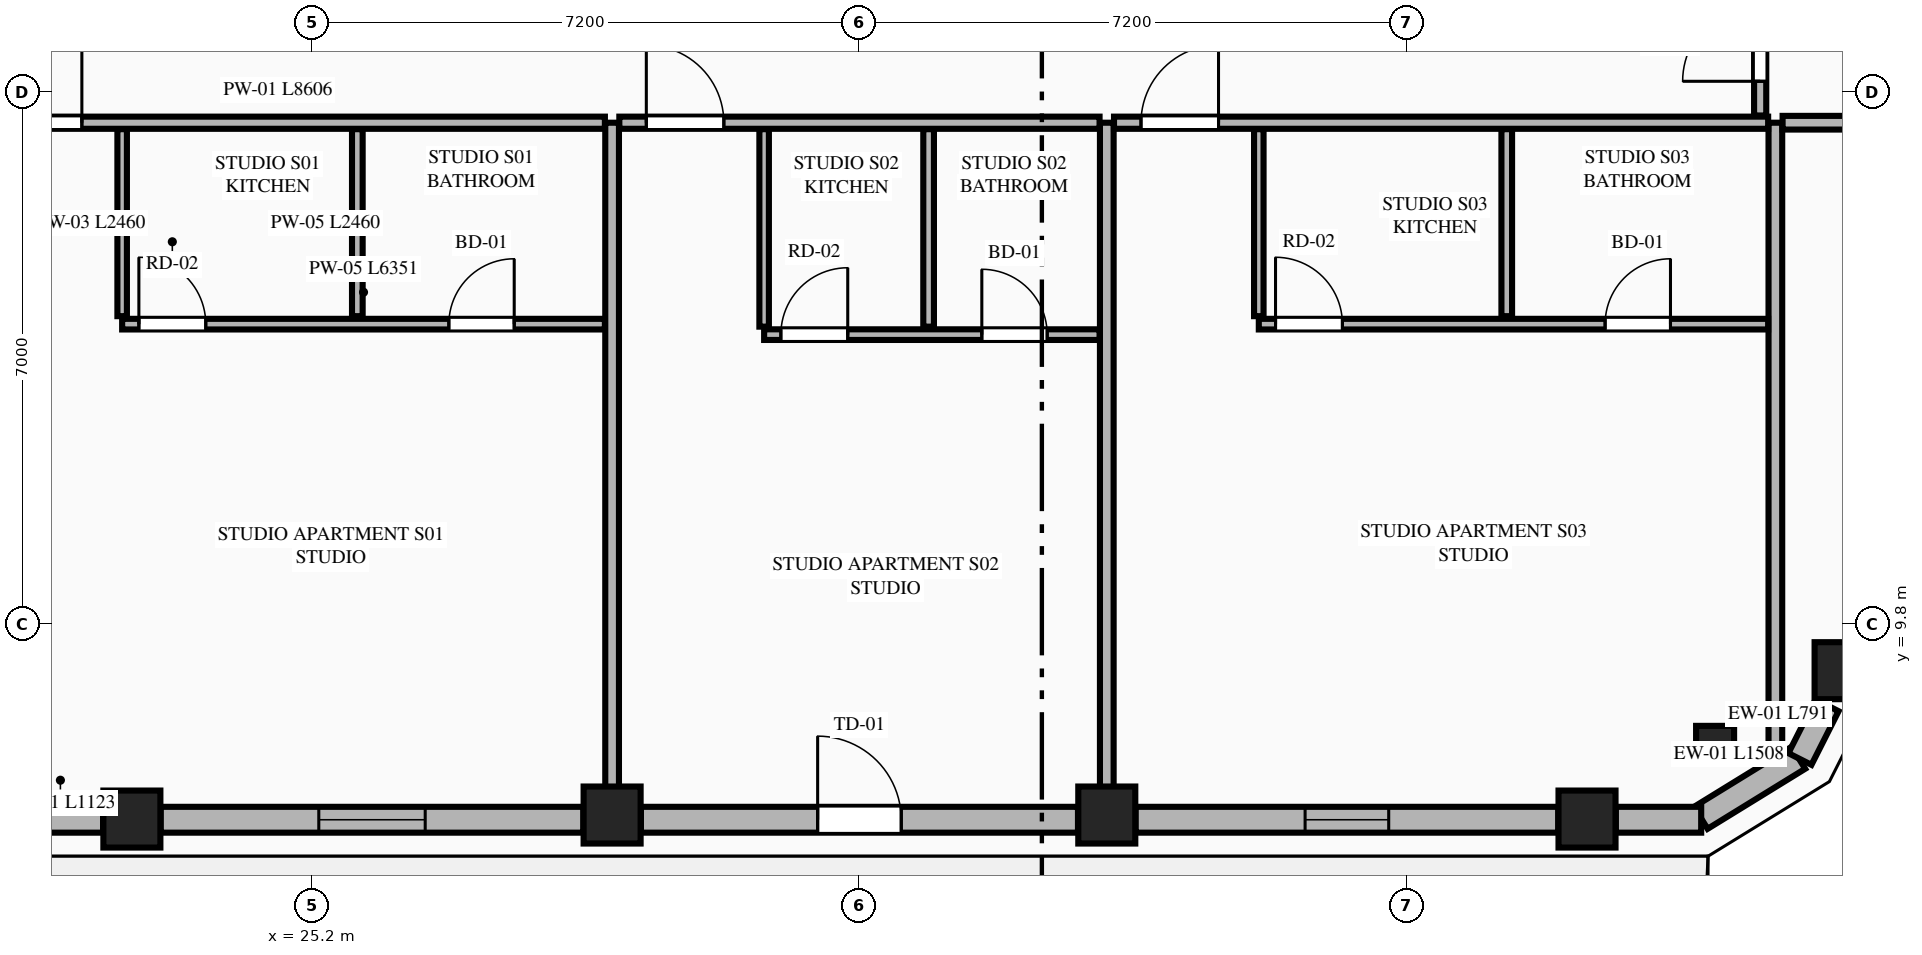
"""IFC4 building model, lengths in metres.
Left out: names, types, materials, properties, quantities, classifications, styles, units other than length and angle.
Written with IfcOpenShell. Run it as: python <this file> out.ifc"""

import sys

from ifc_helpers import new_model, si_unit, direction, frame, frame_2d, origin, origin_2d, place, context, subcontext, project, spatial, rectangle, extrude, element, fill, save


model = new_model("IFC4")
c1 = context("Model", 3, precision=1e-05, world=origin(), true_north=direction((0.0, 1.0)))
c2 = subcontext(c1, "Body", "Model", "MODEL_VIEW")
j1 = project(units=[si_unit("LENGTHUNIT", "METRE"), si_unit("PLANEANGLEUNIT", "RADIAN")], contexts=[c1])
p1 = place(None, origin())
s1 = spatial("IfcSite", under=j1, at=p1, CompositionType="ELEMENT")
p2 = place(p1, origin())
s2 = spatial("IfcBuilding", under=s1, at=p2, CompositionType="ELEMENT")
p3 = place(p2, frame((0.0, 0.0, 245.25)))
s3 = spatial("IfcBuildingStorey", under=s2, at=p3, CompositionType="ELEMENT", Elevation=245.25)
for number, where, z_axis, x_axis in (
    (1, (22.828, 7.239, 0.0), (0.0, 0.0, 1.0), (1.0, 0.0, 0.0)),
    (2, (29.146, 7.292, 0.0), (0.0, 0.0, 1.0), (1.0, 0.0, 0.0)),
    (3, (35.654, 7.292, 0.0), (0.0, 0.0, 1.0), (1.0, 0.0, 0.0)),
    (4, (41.972, 7.239, 0.0), (0.0, 0.0, 1.0), (1.0, 0.0, 0.0)),
    (5, (45.341, 9.191, 0.0), (0.0, 0.0, 1.0), (1.0, 0.0, 0.0)),
):
    element("IfcColumn", number, at=place(p3, frame(where, z_axis=z_axis, x_axis=x_axis)), inside=s3, PredefinedType="COLUMN", context=c2, shape_type="SweptSolid", body=[
        extrude(rectangle(XDim=0.75, YDim=0.75, at=origin_2d()), origin(), (0.0, 0.0, 1.0), 3.65),
    ])
p4 = place(p3, frame((43.657, 8.215, 0.0), z_axis=(0.0, 0.0, 1.0), x_axis=(0.865256437757, 0.501329529272, 0.0)))
e6 = element("IfcColumn", 6, at=p4, inside=s3, PredefinedType="PILASTER", context=c2, shape_type="SweptSolid", body=[
    extrude(rectangle(XDim=0.5, YDim=0.35, at=origin_2d()), origin(), (0.0, 0.0, 1.0), 3.65),
])
p5 = place(p3, frame((43.469, 7.255, 0.0), z_axis=(0.0, 0.0, 1.0), x_axis=(0.851680557619, 0.52406128246, 0.0)))
e7 = element("IfcWall", 7, at=p5, inside=s3, PredefinedType="STANDARD", context=c2, shape_type="SweptSolid", body=[
    extrude(rectangle(XDim=1.508, YDim=0.34, at=frame_2d((0.754, 0.0))), origin(), (0.0, 0.0, 1.0), 3.45),
])
p6 = place(p3, frame((21.326, 7.23, 0.0), z_axis=(0.0, 0.0, 1.0), x_axis=(1.0, 0.0, 0.0)))
e8 = element("IfcWall", 8, at=p6, inside=s3, PredefinedType="STANDARD", context=c2, shape_type="SweptSolid", body=[
    extrude(rectangle(XDim=1.123, YDim=0.34, at=frame_2d((0.562, 0.0))), origin(), (0.0, 0.0, 1.0), 3.45),
])
p7 = place(p3, frame((23.207, 7.23, 0.0), z_axis=(0.0, 0.0, 1.0), x_axis=(1.0, 0.0, 0.0)))
e9 = element("IfcWall", 9, at=p7, inside=s3, PredefinedType="STANDARD", context=c2, shape_type="SweptSolid", body=[
    extrude(rectangle(XDim=5.56, YDim=0.34, at=frame_2d((2.78, 0.0))), origin(), (0.0, 0.0, 1.0), 2.983),
])
p8 = place(p7, frame((2.08, 0.0, 0.75)))
e10 = element("IfcOpeningElement", 10, at=p8, cuts=e9, PredefinedType="OPENING", context=c2, shape_type="SweptSolid", body=[
    extrude(rectangle(XDim=1.4, YDim=2.05, at=frame_2d((0.7, 1.025))), frame((0.0, 0.18, 0.0), z_axis=(0.0, -1.0, 0.0), x_axis=(1.0, 0.0, 0.0)), (0.0, 0.0, 1.0), 0.36),
])
p9 = place(p3, frame((29.525, 7.23, 0.0), z_axis=(0.0, 0.0, 1.0), x_axis=(1.0, 0.0, 0.0)))
e11 = element("IfcWall", 11, at=p9, inside=s3, PredefinedType="STANDARD", context=c2, shape_type="SweptSolid", body=[
    extrude(rectangle(XDim=5.75, YDim=0.34, at=frame_2d((2.875, 0.0))), origin(), (0.0, 0.0, 1.0), 2.983),
])
p10 = place(p9, frame((2.325, 0.0, 0.0)))
e12 = element("IfcOpeningElement", 12, at=p10, cuts=e11, PredefinedType="OPENING", context=c2, shape_type="SweptSolid", body=[
    extrude(rectangle(XDim=1.1, YDim=2.25, at=frame_2d((0.55, 1.125))), frame((0.0, 0.18, 0.0), z_axis=(0.0, -1.0, 0.0), x_axis=(1.0, 0.0, 0.0)), (0.0, 0.0, 1.0), 0.36),
])
p11 = place(p3, frame((36.033, 7.23, 0.0), z_axis=(0.0, 0.0, 1.0), x_axis=(1.0, 0.0, 0.0)))
e13 = element("IfcWall", 13, at=p11, inside=s3, PredefinedType="STANDARD", context=c2, shape_type="SweptSolid", body=[
    extrude(rectangle(XDim=5.56, YDim=0.34, at=frame_2d((2.78, 0.0))), origin(), (0.0, 0.0, 1.0), 2.983),
])
p12 = place(p11, frame((2.23, 0.0, 0.75)))
e14 = element("IfcOpeningElement", 14, at=p12, cuts=e13, PredefinedType="OPENING", context=c2, shape_type="SweptSolid", body=[
    extrude(rectangle(XDim=1.1, YDim=2.0, at=frame_2d((0.55, 1.0))), frame((0.0, 0.18, 0.0), z_axis=(0.0, -1.0, 0.0), x_axis=(1.0, 0.0, 0.0)), (0.0, 0.0, 1.0), 0.36),
])
p13 = place(p3, frame((42.351, 7.23, 0.0), z_axis=(0.0, 0.0, 1.0), x_axis=(1.0, 0.0, 0.0)))
e15 = element("IfcWall", 15, at=p13, inside=s3, PredefinedType="STANDARD", context=c2, shape_type="SweptSolid", body=[
    extrude(rectangle(XDim=1.123, YDim=0.34, at=frame_2d((0.562, 0.0))), origin(), (0.0, 0.0, 1.0), 3.45),
])
p14 = place(p3, frame((44.773, 8.029, 0.0), z_axis=(0.0, 0.0, 1.0), x_axis=(0.451159191899, 0.892443490404, 0.0)))
e16 = element("IfcWall", 16, at=p14, inside=s3, PredefinedType="STANDARD", context=c2, shape_type="SweptSolid", body=[
    extrude(rectangle(XDim=0.791, YDim=0.34, at=frame_2d((0.396, 0.0))), origin(), (0.0, 0.0, 1.0), 3.45),
])
for number, where, z_axis, x_axis in (
    (17, (29.146, 7.405, 0.0), (0.0, 0.0, 1.0), (0.0, 1.0, 0.0)),
    (18, (35.654, 7.405, 0.0), (0.0, 0.0, 1.0), (0.0, 1.0, 0.0)),
):
    element("IfcWall", number, at=place(p3, frame(where, z_axis=z_axis, x_axis=x_axis)), inside=s3, PredefinedType="PARTITIONING", context=c2, shape_type="SweptSolid", body=[
        extrude(rectangle(XDim=8.995, YDim=0.18, at=frame_2d((4.498, 0.0))), origin(), (0.0, 0.0, 1.0), 2.907),
    ])
p15 = place(p3, frame((44.45, 8.119, 0.0), z_axis=(0.0, 0.0, 1.0), x_axis=(0.0, 1.0, 0.0)))
e19 = element("IfcWall", 19, at=p15, inside=s3, PredefinedType="PARTITIONING", context=c2, shape_type="SweptSolid", body=[
    extrude(rectangle(XDim=8.281, YDim=0.18, at=frame_2d((4.141, 0.0))), origin(), (0.0, 0.0, 1.0), 3.45),
])
p16 = place(p3, frame((20.445, 16.4, 0.0), z_axis=(0.0, 0.0, 1.0), x_axis=(1.0, 0.0, 0.0)))
e20 = element("IfcWall", 20, at=p16, inside=s3, PredefinedType="PARTITIONING", context=c2, shape_type="SweptSolid", body=[
    extrude(rectangle(XDim=8.606, YDim=0.16, at=frame_2d((4.303, 0.0))), origin(), (0.0, 0.0, 1.0), 3.45),
])
p17 = place(p16, frame((0.705, 0.0, 0.0)))
e21 = element("IfcOpeningElement", 21, at=p17, cuts=e20, PredefinedType="OPENING", context=c2, shape_type="SweptSolid", body=[
    extrude(rectangle(XDim=1.02, YDim=2.25, at=frame_2d((0.51, 1.125))), frame((0.0, 0.09, 0.0), z_axis=(0.0, -1.0, 0.0), x_axis=(1.0, 0.0, 0.0)), (0.0, 0.0, 1.0), 0.18),
])
p18 = place(p3, frame((22.7, 13.855, 0.0), z_axis=(0.0, 0.0, 1.0), x_axis=(0.0, 1.0, 0.0)))
e22 = element("IfcWall", 22, at=p18, inside=s3, PredefinedType="PARTITIONING", context=c2, shape_type="SweptSolid", body=[
    extrude(rectangle(XDim=2.46, YDim=0.125, at=frame_2d((1.23, 0.0))), origin(), (0.0, 0.0, 1.0), 2.907),
])
p19 = place(p3, frame((22.7, 13.75, 0.0), z_axis=(0.0, 0.0, 1.0), x_axis=(1.0, 0.0, 0.0)))
e23 = element("IfcWall", 23, at=p19, inside=s3, PredefinedType="PLUMBINGWALL", context=c2, shape_type="SweptSolid", body=[
    extrude(rectangle(XDim=6.351, YDim=0.14, at=frame_2d((3.176, 0.0))), origin(), (0.0, 0.0, 1.0), 3.45),
])
p20 = place(p19, frame((4.298, 0.0, 0.0)))
e24 = element("IfcOpeningElement", 24, at=p20, cuts=e23, PredefinedType="OPENING", context=c2, shape_type="SweptSolid", body=[
    extrude(rectangle(XDim=0.86, YDim=2.1, at=frame_2d((0.43, 1.05))), frame((0.0, 0.08, 0.0), z_axis=(0.0, -1.0, 0.0), x_axis=(1.0, 0.0, 0.0)), (0.0, 0.0, 1.0), 0.16),
])
p21 = place(p19, frame((0.22, 0.0, 0.0)))
e25 = element("IfcOpeningElement", 25, at=p21, cuts=e23, PredefinedType="OPENING", context=c2, shape_type="SweptSolid", body=[
    extrude(rectangle(XDim=0.88, YDim=2.15, at=frame_2d((0.44, 1.075))), frame((0.0, 0.08, 0.0), z_axis=(0.0, -1.0, 0.0), x_axis=(1.0, 0.0, 0.0)), (0.0, 0.0, 1.0), 0.16),
])
p22 = place(p3, frame((25.794, 13.855, 0.0), z_axis=(0.0, 0.0, 1.0), x_axis=(0.0, 1.0, 0.0)))
e26 = element("IfcWall", 26, at=p22, inside=s3, PredefinedType="PLUMBINGWALL", context=c2, shape_type="SweptSolid", body=[
    extrude(rectangle(XDim=2.46, YDim=0.14, at=frame_2d((1.23, 0.0))), origin(), (0.0, 0.0, 1.0), 3.45),
])
p23 = place(p3, frame((29.241, 16.4, 0.0), z_axis=(0.0, 0.0, 1.0), x_axis=(1.0, 0.0, 0.0)))
e27 = element("IfcWall", 27, at=p23, inside=s3, PredefinedType="PARTITIONING", context=c2, shape_type="SweptSolid", body=[
    extrude(rectangle(XDim=6.318, YDim=0.16, at=frame_2d((3.159, 0.0))), origin(), (0.0, 0.0, 1.0), 3.45),
])
p24 = place(p23, frame((0.355, 0.0, 0.0)))
e28 = element("IfcOpeningElement", 28, at=p24, cuts=e27, PredefinedType="OPENING", context=c2, shape_type="SweptSolid", body=[
    extrude(rectangle(XDim=1.02, YDim=2.25, at=frame_2d((0.51, 1.125))), frame((0.0, 0.09, 0.0), z_axis=(0.0, -1.0, 0.0), x_axis=(1.0, 0.0, 0.0)), (0.0, 0.0, 1.0), 0.18),
])
p25 = place(p3, frame((31.146, 13.717, 0.0), z_axis=(0.0, 0.0, 1.0), x_axis=(0.0, 1.0, 0.0)))
e29 = element("IfcWall", 29, at=p25, inside=s3, PredefinedType="PARTITIONING", context=c2, shape_type="SweptSolid", body=[
    extrude(rectangle(XDim=2.598, YDim=0.125, at=frame_2d((1.299, 0.0))), origin(), (0.0, 0.0, 1.0), 3.45),
])
p26 = place(p3, frame((31.146, 13.612, 0.0), z_axis=(0.0, 0.0, 1.0), x_axis=(1.0, 0.0, 0.0)))
e30 = element("IfcWall", 30, at=p26, inside=s3, PredefinedType="PLUMBINGWALL", context=c2, shape_type="SweptSolid", body=[
    extrude(rectangle(XDim=4.413, YDim=0.14, at=frame_2d((2.207, 0.0))), origin(), (0.0, 0.0, 1.0), 3.45),
])
p27 = place(p26, frame((2.864, 0.0, 0.0)))
e31 = element("IfcOpeningElement", 31, at=p27, cuts=e30, PredefinedType="OPENING", context=c2, shape_type="SweptSolid", body=[
    extrude(rectangle(XDim=0.86, YDim=2.1, at=frame_2d((0.43, 1.05))), frame((0.0, 0.08, 0.0), z_axis=(0.0, -1.0, 0.0), x_axis=(1.0, 0.0, 0.0)), (0.0, 0.0, 1.0), 0.16),
])
p28 = place(p26, frame((0.22, 0.0, 0.0)))
e32 = element("IfcOpeningElement", 32, at=p28, cuts=e30, PredefinedType="OPENING", context=c2, shape_type="SweptSolid", body=[
    extrude(rectangle(XDim=0.88, YDim=2.15, at=frame_2d((0.44, 1.075))), frame((0.0, 0.08, 0.0), z_axis=(0.0, -1.0, 0.0), x_axis=(1.0, 0.0, 0.0)), (0.0, 0.0, 1.0), 0.16),
])
p29 = place(p3, frame((33.31, 13.717, 0.0), z_axis=(0.0, 0.0, 1.0), x_axis=(0.0, 1.0, 0.0)))
e33 = element("IfcWall", 33, at=p29, inside=s3, PredefinedType="PLUMBINGWALL", context=c2, shape_type="SweptSolid", body=[
    extrude(rectangle(XDim=2.598, YDim=0.14, at=frame_2d((1.299, 0.0))), origin(), (0.0, 0.0, 1.0), 3.45),
])
p30 = place(p3, frame((35.749, 16.4, 0.0), z_axis=(0.0, 0.0, 1.0), x_axis=(1.0, 0.0, 0.0)))
e34 = element("IfcWall", 34, at=p30, inside=s3, PredefinedType="PARTITIONING", context=c2, shape_type="SweptSolid", body=[
    extrude(rectangle(XDim=8.606, YDim=0.16, at=frame_2d((4.303, 0.0))), origin(), (0.0, 0.0, 1.0), 3.45),
])
p31 = place(p30, frame((0.355, 0.0, 0.0)))
e35 = element("IfcOpeningElement", 35, at=p31, cuts=e34, PredefinedType="OPENING", context=c2, shape_type="SweptSolid", body=[
    extrude(rectangle(XDim=1.02, YDim=2.25, at=frame_2d((0.51, 1.125))), frame((0.0, 0.09, 0.0), z_axis=(0.0, -1.0, 0.0), x_axis=(1.0, 0.0, 0.0)), (0.0, 0.0, 1.0), 0.18),
])
p32 = place(p3, frame((37.654, 13.855, 0.0), z_axis=(0.0, 0.0, 1.0), x_axis=(0.0, 1.0, 0.0)))
e36 = element("IfcWall", 36, at=p32, inside=s3, PredefinedType="PARTITIONING", context=c2, shape_type="SweptSolid", body=[
    extrude(rectangle(XDim=2.46, YDim=0.125, at=frame_2d((1.23, 0.0))), origin(), (0.0, 0.0, 1.0), 3.45),
])
p33 = place(p3, frame((37.654, 13.75, 0.0), z_axis=(0.0, 0.0, 1.0), x_axis=(1.0, 0.0, 0.0)))
e37 = element("IfcWall", 37, at=p33, inside=s3, PredefinedType="PLUMBINGWALL", context=c2, shape_type="SweptSolid", body=[
    extrude(rectangle(XDim=6.701, YDim=0.14, at=frame_2d((3.351, 0.0))), origin(), (0.0, 0.0, 1.0), 3.45),
])
p34 = place(p33, frame((4.556, 0.0, 0.0)))
e38 = element("IfcOpeningElement", 38, at=p34, cuts=e37, PredefinedType="OPENING", context=c2, shape_type="SweptSolid", body=[
    extrude(rectangle(XDim=0.86, YDim=2.1, at=frame_2d((0.43, 1.05))), frame((0.0, 0.08, 0.0), z_axis=(0.0, -1.0, 0.0), x_axis=(1.0, 0.0, 0.0)), (0.0, 0.0, 1.0), 0.16),
])
p35 = place(p33, frame((0.22, 0.0, 0.0)))
e39 = element("IfcOpeningElement", 39, at=p35, cuts=e37, PredefinedType="OPENING", context=c2, shape_type="SweptSolid", body=[
    extrude(rectangle(XDim=0.88, YDim=2.15, at=frame_2d((0.44, 1.075))), frame((0.0, 0.08, 0.0), z_axis=(0.0, -1.0, 0.0), x_axis=(1.0, 0.0, 0.0)), (0.0, 0.0, 1.0), 0.16),
])
p36 = place(p3, frame((40.916, 13.855, 0.0), z_axis=(0.0, 0.0, 1.0), x_axis=(0.0, 1.0, 0.0)))
e40 = element("IfcWall", 40, at=p36, inside=s3, PredefinedType="PLUMBINGWALL", context=c2, shape_type="SweptSolid", body=[
    extrude(rectangle(XDim=2.46, YDim=0.14, at=frame_2d((1.23, 0.0))), origin(), (0.0, 0.0, 1.0), 3.45),
])
p37 = place(p3, frame((44.545, 16.4, 0.0), z_axis=(0.0, 0.0, 1.0), x_axis=(1.0, 0.0, 0.0)))
e41 = element("IfcWall", 41, at=p37, inside=s3, PredefinedType="PARTITIONING", context=c2, shape_type="SweptSolid", body=[
    extrude(rectangle(XDim=4.221, YDim=0.18, at=frame_2d((2.111, 0.0))), origin(), (0.0, 0.0, 1.0), 3.45),
])
p38 = place(p3, frame((44.25, 16.495, 0.0), z_axis=(0.0, 0.0, 1.0), x_axis=(0.0, 1.0, 0.0)))
e42 = element("IfcWall", 42, at=p38, inside=s3, PredefinedType="PARTITIONING", context=c2, shape_type="SweptSolid", body=[
    extrude(rectangle(XDim=18.41, YDim=0.16, at=frame_2d((9.205, 0.0))), origin(), (0.0, 0.0, 1.0), 3.137),
])
p39 = place(p38, frame((0.45, 0.0, 0.0)))
e43 = element("IfcOpeningElement", 43, at=p39, cuts=e42, PredefinedType="OPENING", context=c2, shape_type="SweptSolid", body=[
    extrude(rectangle(XDim=1.02, YDim=2.25, at=frame_2d((0.51, 1.125))), frame((0.0, 0.09, 0.0), z_axis=(0.0, -1.0, 0.0), x_axis=(1.0, 0.0, 0.0)), (0.0, 0.0, 1.0), 0.18),
])
p40 = place(p8, origin())
e44 = element("IfcWindow", 44, at=p40, inside=s3, PartitioningType="SINGLE_PANEL", PredefinedType="WINDOW", context=c2, shape_type="SweptSolid", body=[
    extrude(rectangle(XDim=1.4, YDim=2.05, at=frame_2d((0.7, 1.025))), frame((0.0, 0.03, 0.0), z_axis=(0.0, -1.0, 0.0), x_axis=(1.0, 0.0, 0.0)), (0.0, 0.0, 1.0), 0.06),
])
fill(e10, e44)
p41 = place(p10, origin())
e45 = element("IfcDoor", 45, at=p41, inside=s3, OperationType="SINGLE_SWING_LEFT", PredefinedType="DOOR", context=c2, shape_type="SweptSolid", body=[
    extrude(rectangle(XDim=1.1, YDim=2.25, at=frame_2d((0.55, 1.125))), frame((0.0, 0.025, 0.0), z_axis=(0.0, -1.0, 0.0), x_axis=(1.0, 0.0, 0.0)), (0.0, 0.0, 1.0), 0.05),
])
fill(e12, e45)
p42 = place(p12, origin())
e46 = element("IfcWindow", 46, at=p42, inside=s3, PartitioningType="SINGLE_PANEL", PredefinedType="WINDOW", context=c2, shape_type="SweptSolid", body=[
    extrude(rectangle(XDim=1.1, YDim=2.0, at=frame_2d((0.55, 1.0))), frame((0.0, 0.03, 0.0), z_axis=(0.0, -1.0, 0.0), x_axis=(1.0, 0.0, 0.0)), (0.0, 0.0, 1.0), 0.06),
])
fill(e14, e46)
p43 = place(p20, origin())
e47 = element("IfcDoor", 47, at=p43, inside=s3, OperationType="SINGLE_SWING_RIGHT", PredefinedType="DOOR", context=c2, shape_type="SweptSolid", body=[
    extrude(rectangle(XDim=0.86, YDim=2.1, at=frame_2d((0.43, 1.05))), frame((0.0, 0.025, 0.0), z_axis=(0.0, -1.0, 0.0), x_axis=(1.0, 0.0, 0.0)), (0.0, 0.0, 1.0), 0.05),
])
fill(e24, e47)
p44 = place(p17, origin())
e48 = element("IfcDoor", 48, at=p44, inside=s3, OperationType="SINGLE_SWING_RIGHT", PredefinedType="DOOR", context=c2, shape_type="SweptSolid", body=[
    extrude(rectangle(XDim=1.02, YDim=2.25, at=frame_2d((0.51, 1.125))), frame((0.0, 0.025, 0.0), z_axis=(0.0, -1.0, 0.0), x_axis=(1.0, 0.0, 0.0)), (0.0, 0.0, 1.0), 0.05),
])
fill(e21, e48)
p45 = place(p21, origin())
e49 = element("IfcDoor", 49, at=p45, inside=s3, OperationType="SINGLE_SWING_LEFT", PredefinedType="DOOR", context=c2, shape_type="SweptSolid", body=[
    extrude(rectangle(XDim=0.88, YDim=2.15, at=frame_2d((0.44, 1.075))), frame((0.0, 0.025, 0.0), z_axis=(0.0, -1.0, 0.0), x_axis=(1.0, 0.0, 0.0)), (0.0, 0.0, 1.0), 0.05),
])
fill(e25, e49)
p46 = place(p27, origin())
e50 = element("IfcDoor", 50, at=p46, inside=s3, OperationType="SINGLE_SWING_LEFT", PredefinedType="DOOR", context=c2, shape_type="SweptSolid", body=[
    extrude(rectangle(XDim=0.86, YDim=2.1, at=frame_2d((0.43, 1.05))), frame((0.0, 0.025, 0.0), z_axis=(0.0, -1.0, 0.0), x_axis=(1.0, 0.0, 0.0)), (0.0, 0.0, 1.0), 0.05),
])
fill(e31, e50)
p47 = place(p24, origin())
e51 = element("IfcDoor", 51, at=p47, inside=s3, OperationType="SINGLE_SWING_LEFT", PredefinedType="DOOR", context=c2, shape_type="SweptSolid", body=[
    extrude(rectangle(XDim=1.02, YDim=2.25, at=frame_2d((0.51, 1.125))), frame((0.0, 0.025, 0.0), z_axis=(0.0, -1.0, 0.0), x_axis=(1.0, 0.0, 0.0)), (0.0, 0.0, 1.0), 0.05),
])
fill(e28, e51)
p48 = place(p28, origin())
e52 = element("IfcDoor", 52, at=p48, inside=s3, OperationType="SINGLE_SWING_RIGHT", PredefinedType="DOOR", context=c2, shape_type="SweptSolid", body=[
    extrude(rectangle(XDim=0.88, YDim=2.15, at=frame_2d((0.44, 1.075))), frame((0.0, 0.025, 0.0), z_axis=(0.0, -1.0, 0.0), x_axis=(1.0, 0.0, 0.0)), (0.0, 0.0, 1.0), 0.05),
])
fill(e32, e52)
p49 = place(p34, origin())
e53 = element("IfcDoor", 53, at=p49, inside=s3, OperationType="SINGLE_SWING_RIGHT", PredefinedType="DOOR", context=c2, shape_type="SweptSolid", body=[
    extrude(rectangle(XDim=0.86, YDim=2.1, at=frame_2d((0.43, 1.05))), frame((0.0, 0.025, 0.0), z_axis=(0.0, -1.0, 0.0), x_axis=(1.0, 0.0, 0.0)), (0.0, 0.0, 1.0), 0.05),
])
fill(e38, e53)
p50 = place(p31, origin())
e54 = element("IfcDoor", 54, at=p50, inside=s3, OperationType="SINGLE_SWING_RIGHT", PredefinedType="DOOR", context=c2, shape_type="SweptSolid", body=[
    extrude(rectangle(XDim=1.02, YDim=2.25, at=frame_2d((0.51, 1.125))), frame((0.0, 0.025, 0.0), z_axis=(0.0, -1.0, 0.0), x_axis=(1.0, 0.0, 0.0)), (0.0, 0.0, 1.0), 0.05),
])
fill(e35, e54)
p51 = place(p35, origin())
e55 = element("IfcDoor", 55, at=p51, inside=s3, OperationType="SINGLE_SWING_LEFT", PredefinedType="DOOR", context=c2, shape_type="SweptSolid", body=[
    extrude(rectangle(XDim=0.88, YDim=2.15, at=frame_2d((0.44, 1.075))), frame((0.0, 0.025, 0.0), z_axis=(0.0, -1.0, 0.0), x_axis=(1.0, 0.0, 0.0)), (0.0, 0.0, 1.0), 0.05),
])
fill(e39, e55)
p52 = place(p39, origin())
e56 = element("IfcDoor", 56, at=p52, inside=s3, OperationType="SINGLE_SWING_LEFT", PredefinedType="DOOR", context=c2, shape_type="SweptSolid", body=[
    extrude(rectangle(XDim=1.02, YDim=2.25, at=frame_2d((0.51, 1.125))), frame((0.0, 0.025, 0.0), z_axis=(0.0, -1.0, 0.0), x_axis=(1.0, 0.0, 0.0)), (0.0, 0.0, 1.0), 0.05),
])
fill(e43, e56)
save(model, sys.argv[1])
